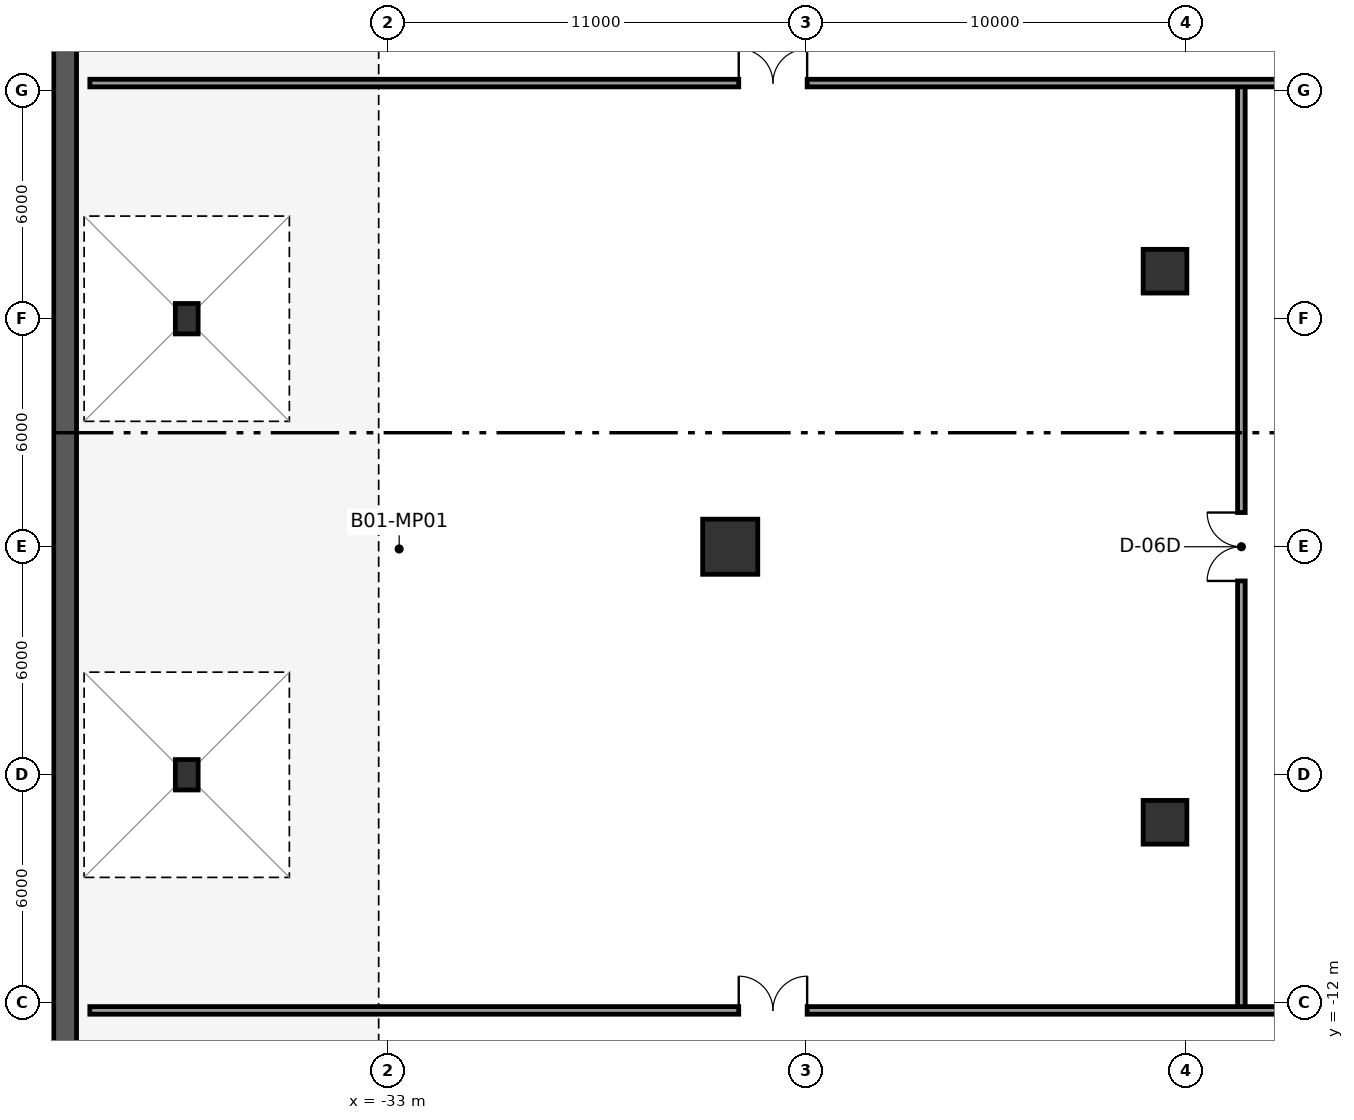
"""IFC4 building model, lengths in metres.
Left out: names, types, materials, properties, quantities, classifications, styles, units other than length and angle.
Written with IfcOpenShell. Run it as: python <this file> out.ifc"""

import sys

from ifc_helpers import new_model, si_unit, direction, frame, frame_2d, origin, origin_2d, place, context, subcontext, project, spatial, rectangle, hollow_rectangle, extrude, element, fill, save


model = new_model("IFC4")
c1 = context("Model", 3, precision=1e-05, world=origin(), true_north=direction((0.0, 1.0)))
c2 = subcontext(c1, "Body", "Model", "MODEL_VIEW")
j1 = project(units=[si_unit("LENGTHUNIT", "METRE"), si_unit("PLANEANGLEUNIT", "RADIAN")], contexts=[c1])
p1 = place(None, origin())
s1 = spatial("IfcSite", under=j1, at=p1, CompositionType="ELEMENT")
p2 = place(p1, origin())
s2 = spatial("IfcBuilding", under=s1, at=p2, CompositionType="ELEMENT")
p3 = place(p2, frame((0.0, 0.0, -5.4)))
s3 = spatial("IfcBuildingStorey", under=s2, at=p3, CompositionType="ELEMENT", Elevation=-5.4)
p4 = place(p3, frame((-41.5, 30.5, 0.0), z_axis=(0.0, 0.0, 1.0), x_axis=(0.0, -1.0, 0.0)))
e1 = element("IfcWall", 1, at=p4, inside=s3, PredefinedType="SHEAR", context=c2, shape_type="SweptSolid", body=[
    extrude(rectangle(XDim=61.0, YDim=0.6, at=frame_2d((30.5, 0.0))), origin(), (0.0, 0.0, 1.0), 5.1),
])
for number, where, z_axis, x_axis in (
    (2, (-12.56, -7.25, 0.0), (0.0, 0.0, 1.0), (1.0, 0.0, 0.0)),
    (3, (-12.56, 7.25, 0.0), (0.0, 0.0, 1.0), (1.0, 0.0, 0.0)),
):
    element("IfcColumn", number, at=place(p3, frame(where, z_axis=z_axis, x_axis=x_axis)), inside=s3, PredefinedType="COLUMN", context=c2, shape_type="SweptSolid", body=[
        extrude(rectangle(XDim=1.15, YDim=1.15, at=origin_2d()), origin(), (0.0, 0.0, 1.0), 5.4),
    ])
p5 = place(p3, frame((-24.0, 0.0, 0.0), z_axis=(0.0, 0.0, 1.0), x_axis=(1.0, 0.0, 0.0)))
e4 = element("IfcColumn", 4, at=p5, inside=s3, PredefinedType="COLUMN", context=c2, shape_type="SweptSolid", body=[
    extrude(rectangle(XDim=1.45, YDim=1.45, at=origin_2d()), origin(), (0.0, 0.0, 1.0), 5.4),
])
for number, where, z_axis, x_axis in (
    (5, (-38.3, -6.0, 0.0), (0.0, 0.0, 1.0), (1.0, 0.0, 0.0)),
    (6, (-38.3, 6.0, 0.0), (0.0, 0.0, 1.0), (1.0, 0.0, 0.0)),
):
    element("IfcColumn", number, at=place(p3, frame(where, z_axis=z_axis, x_axis=x_axis)), inside=s3, PredefinedType="COLUMN", context=c2, shape_type="SweptSolid", body=[
        extrude(hollow_rectangle(XDim=0.6, YDim=0.8, WallThickness=0.05, at=origin_2d()), origin(), (0.0, 0.0, 1.0), 5.4),
    ])
p6 = place(p3, frame((-10.55, -12.2, 0.0), z_axis=(0.0, 0.0, 1.0), x_axis=(0.0, 1.0, 0.0)))
e7 = element("IfcWall", 7, at=p6, inside=s3, PredefinedType="PARTITIONING", context=c2, shape_type="SweptSolid", body=[
    extrude(rectangle(XDim=24.4, YDim=0.2, at=frame_2d((12.2, 0.0))), origin(), (0.0, 0.0, 1.0), 5.1),
])
p7 = place(p6, frame((11.3, 0.0, 0.0)))
e8 = element("IfcOpeningElement", 8, at=p7, cuts=e7, PredefinedType="OPENING", context=c2, shape_type="SweptSolid", body=[
    extrude(rectangle(XDim=1.8, YDim=2.2, at=frame_2d((0.9, 1.1))), frame((0.0, 0.11, 0.0), z_axis=(0.0, -1.0, 0.0), x_axis=(1.0, 0.0, 0.0)), (0.0, 0.0, 1.0), 0.22),
])
p8 = place(p3, frame((-40.85, 12.2, 0.0), z_axis=(0.0, 0.0, 1.0), x_axis=(1.0, 0.0, 0.0)))
e9 = element("IfcWall", 9, at=p8, inside=s3, PredefinedType="PARTITIONING", context=c2, shape_type="SweptSolid", body=[
    extrude(rectangle(XDim=81.7, YDim=0.2, at=frame_2d((40.85, 0.0))), origin(), (0.0, 0.0, 1.0), 5.1),
])
p9 = place(p8, frame((17.074, 0.0, 0.0)))
e10 = element("IfcOpeningElement", 10, at=p9, cuts=e9, PredefinedType="OPENING", context=c2, shape_type="SweptSolid", body=[
    extrude(rectangle(XDim=1.8, YDim=2.2, at=frame_2d((0.9, 1.1))), frame((0.0, 0.11, 0.0), z_axis=(0.0, -1.0, 0.0), x_axis=(1.0, 0.0, 0.0)), (0.0, 0.0, 1.0), 0.22),
])
p10 = place(p3, frame((-40.85, -12.2, 0.0), z_axis=(0.0, 0.0, 1.0), x_axis=(1.0, 0.0, 0.0)))
e11 = element("IfcWall", 11, at=p10, inside=s3, PredefinedType="PARTITIONING", context=c2, shape_type="SweptSolid", body=[
    extrude(rectangle(XDim=81.7, YDim=0.2, at=frame_2d((40.85, 0.0))), origin(), (0.0, 0.0, 1.0), 5.1),
])
p11 = place(p10, frame((17.074, 0.0, 0.0)))
e12 = element("IfcOpeningElement", 12, at=p11, cuts=e11, PredefinedType="OPENING", context=c2, shape_type="SweptSolid", body=[
    extrude(rectangle(XDim=1.8, YDim=2.2, at=frame_2d((0.9, 1.1))), frame((0.0, 0.11, 0.0), z_axis=(0.0, -1.0, 0.0), x_axis=(1.0, 0.0, 0.0)), (0.0, 0.0, 1.0), 0.22),
])
p12 = place(p7, origin())
e13 = element("IfcDoor", 13, at=p12, inside=s3, OperationType="DOUBLE_DOOR_SINGLE_SWING", PredefinedType="DOOR", context=c2, shape_type="SweptSolid", body=[
    extrude(rectangle(XDim=1.8, YDim=2.2, at=frame_2d((0.9, 1.1))), frame((0.0, 0.025, 0.0), z_axis=(0.0, -1.0, 0.0), x_axis=(1.0, 0.0, 0.0)), (0.0, 0.0, 1.0), 0.05),
])
fill(e8, e13)
p13 = place(p9, origin())
e14 = element("IfcDoor", 14, at=p13, inside=s3, OperationType="DOUBLE_DOOR_SINGLE_SWING", PredefinedType="DOOR", context=c2, shape_type="SweptSolid", body=[
    extrude(rectangle(XDim=1.8, YDim=2.2, at=frame_2d((0.9, 1.1))), frame((0.0, 0.025, 0.0), z_axis=(0.0, -1.0, 0.0), x_axis=(1.0, 0.0, 0.0)), (0.0, 0.0, 1.0), 0.05),
])
fill(e10, e14)
p14 = place(p11, origin())
e15 = element("IfcDoor", 15, at=p14, inside=s3, OperationType="DOUBLE_DOOR_SINGLE_SWING", PredefinedType="DOOR", context=c2, shape_type="SweptSolid", body=[
    extrude(rectangle(XDim=1.8, YDim=2.2, at=frame_2d((0.9, 1.1))), frame((0.0, 0.025, 0.0), z_axis=(0.0, -1.0, 0.0), x_axis=(1.0, 0.0, 0.0)), (0.0, 0.0, 1.0), 0.05),
])
fill(e12, e15)
save(model, sys.argv[1])
